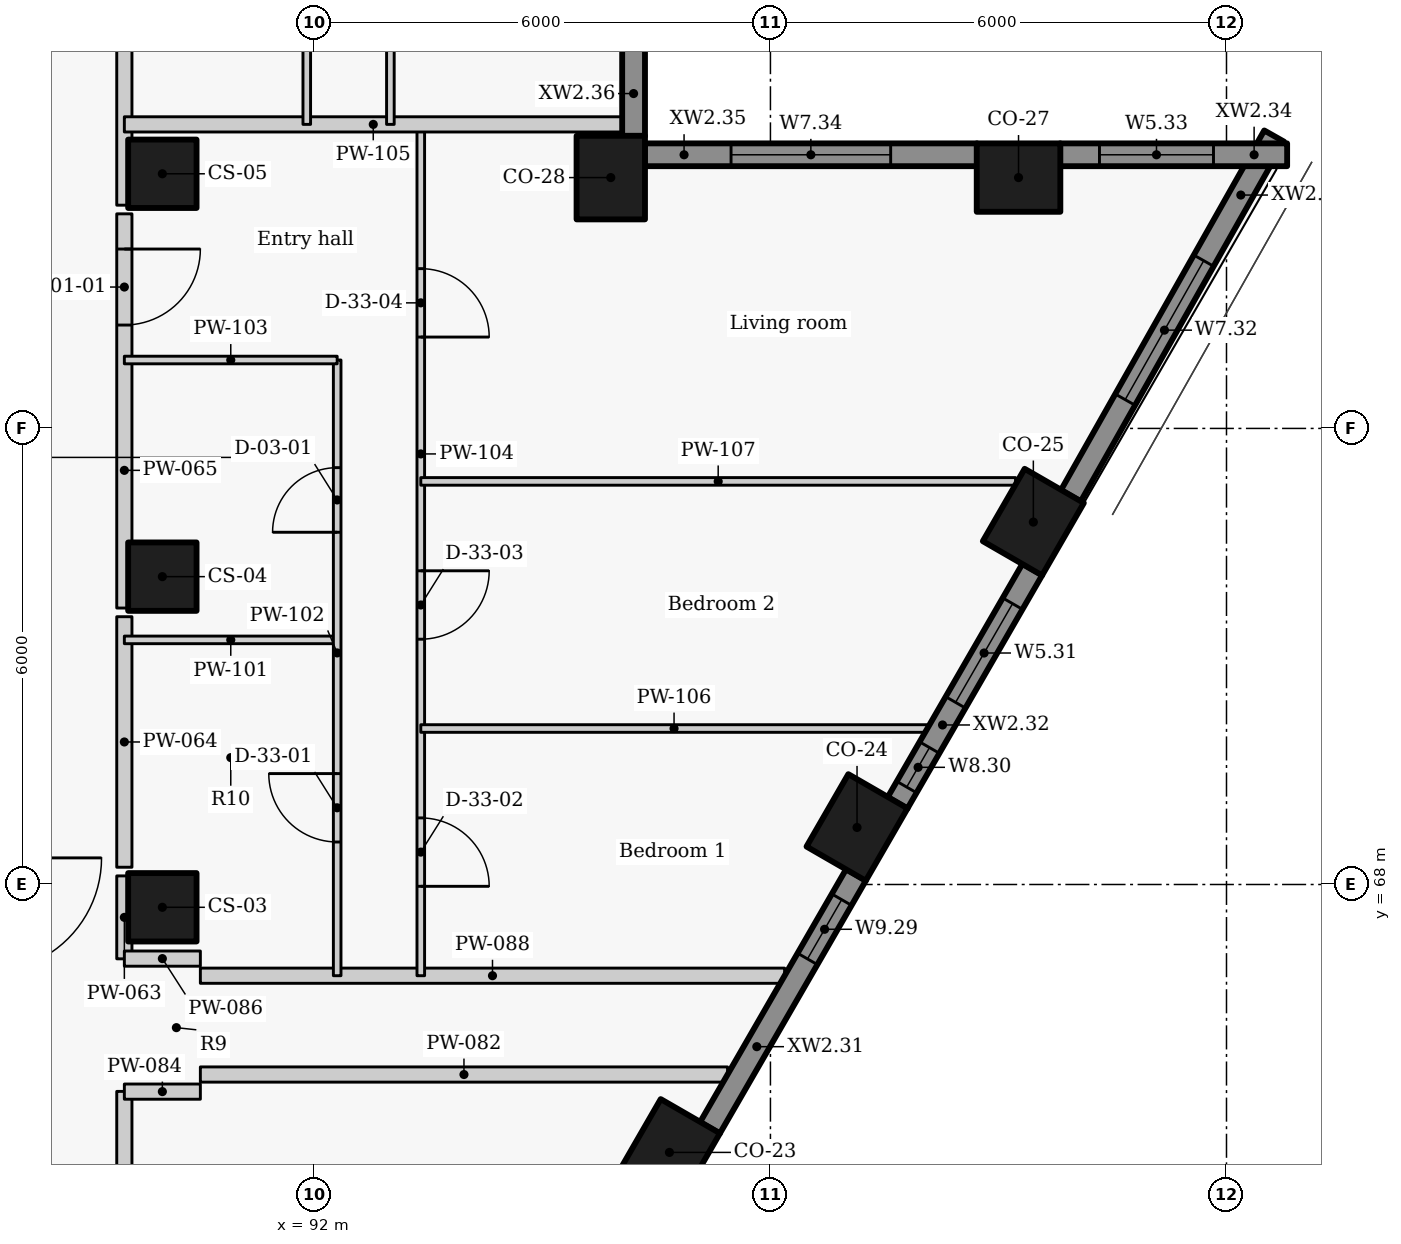
"""IFC4 building model, lengths in metres.
Left out: names, types, materials, properties, quantities, classifications, styles, units other than length and angle.
Written with IfcOpenShell. Run it as: python <this file> out.ifc"""

import sys

from ifc_helpers import new_model, si_unit, direction, frame, frame_2d, origin, origin_2d, place, context, subcontext, project, spatial, rectangle, extrude, element, fill, save


model = new_model("IFC4")
c1 = context("Model", 3, precision=1e-05, world=origin(), true_north=direction((0.0, 1.0)))
c2 = subcontext(c1, "Body", "Model", "MODEL_VIEW")
j1 = project(units=[si_unit("LENGTHUNIT", "METRE"), si_unit("PLANEANGLEUNIT", "RADIAN")], contexts=[c1])
p1 = place(None, origin())
s1 = spatial("IfcSite", under=j1, at=p1, CompositionType="ELEMENT")
p2 = place(p1, origin())
s2 = spatial("IfcBuilding", under=s1, at=p2, CompositionType="ELEMENT")
p3 = place(p2, frame((0.0, 0.0, 239.4)))
s3 = spatial("IfcBuildingStorey", under=s2, at=p3, CompositionType="ELEMENT", Elevation=239.4)
for number, where, z_axis, x_axis in (
    (1, (96.671, 64.475, 0.0), (0.0, 0.0, 1.0), (0.5, 0.866, 0.0)),
    (2, (99.139, 68.75, 0.0), (0.0, 0.0, 1.0), (0.5, 0.866, 0.0)),
    (3, (101.459, 72.768, 0.0), (0.0, 0.0, 1.0), (0.5, 0.866, 0.0)),
    (4, (101.264, 77.3, 0.0), (0.0, 0.0, 1.0), (-1.0, 0.0, 0.0)),
    (5, (95.899, 77.3, 0.0), (0.0, 0.0, 1.0), (0.0, 1.0, 0.0)),
):
    element("IfcColumn", number, at=place(p3, frame(where, z_axis=z_axis, x_axis=x_axis)), inside=s3, PredefinedType="COLUMN", context=c2, shape_type="SweptSolid", body=[
        extrude(rectangle(XDim=1.1, YDim=0.9, at=origin_2d()), origin(), (0.0, 0.0, 1.0), 3.3),
    ])
for number, where, z_axis, x_axis in (
    (6, (90.0, 67.7, 0.0), (0.0, 0.0, 1.0), (0.0, 1.0, 0.0)),
    (7, (90.0, 72.05, 0.0), (0.0, 0.0, 1.0), (0.0, 1.0, 0.0)),
    (8, (90.0, 77.35, 0.0), (0.0, 0.0, 1.0), (0.0, 1.0, 0.0)),
):
    element("IfcColumn", number, at=place(p3, frame(where, z_axis=z_axis, x_axis=x_axis)), inside=s3, PredefinedType="COLUMN", context=c2, shape_type="SweptSolid", body=[
        extrude(rectangle(XDim=0.9, YDim=0.9, at=origin_2d()), origin(), (0.0, 0.0, 1.0), 3.3),
    ])
p4 = place(p3, frame((97.204, 64.798, 0.0), z_axis=(0.0, 0.0, 1.0), x_axis=(0.499984490703, 0.866034357896, 0.0)))
e9 = element("IfcWall", 9, at=p4, inside=s3, PredefinedType="SOLIDWALL", context=c2, shape_type="SweptSolid", body=[
    extrude(rectangle(XDim=3.844, YDim=0.3, at=frame_2d((1.922, 0.0))), origin(), (0.0, 0.0, 1.0), 2.425),
])
p5 = place(p4, frame((2.567, 0.0, 0.9)))
e10 = element("IfcOpeningElement", 10, at=p5, cuts=e9, PredefinedType="OPENING", context=c2, shape_type="SweptSolid", body=[
    extrude(rectangle(XDim=0.9, YDim=1.1, at=frame_2d((0.45, 0.55))), frame((0.0, 0.16, 0.0), z_axis=(0.0, -1.0, 0.0), x_axis=(1.0, 0.0, 0.0)), (0.0, 0.0, 1.0), 0.32),
])
p6 = place(p3, frame((99.672, 69.073, 0.0), z_axis=(0.0, 0.0, 1.0), x_axis=(0.500010404316, 0.866019396766, 0.0)))
e11 = element("IfcWall", 11, at=p6, inside=s3, PredefinedType="SOLIDWALL", context=c2, shape_type="SweptSolid", body=[
    extrude(rectangle(XDim=3.547, YDim=0.3, at=frame_2d((1.774, 0.0))), origin(), (0.0, 0.0, 1.0), 2.425),
])
p7 = place(p6, frame((0.241, 0.0, 0.9)))
e12 = element("IfcOpeningElement", 12, at=p7, cuts=e11, PredefinedType="OPENING", context=c2, shape_type="SweptSolid", body=[
    extrude(rectangle(XDim=0.6, YDim=1.1, at=frame_2d((0.3, 0.55))), frame((0.0, 0.16, 0.0), z_axis=(0.0, -1.0, 0.0), x_axis=(1.0, 0.0, 0.0)), (0.0, 0.0, 1.0), 0.32),
])
p8 = place(p6, frame((1.527, 0.0, 0.9)))
e13 = element("IfcOpeningElement", 13, at=p8, cuts=e11, PredefinedType="OPENING", context=c2, shape_type="SweptSolid", body=[
    extrude(rectangle(XDim=1.5, YDim=1.1, at=frame_2d((0.75, 0.55))), frame((0.0, 0.16, 0.0), z_axis=(0.0, -1.0, 0.0), x_axis=(1.0, 0.0, 0.0)), (0.0, 0.0, 1.0), 0.32),
])
p9 = place(p3, frame((101.952, 73.114, 0.0), z_axis=(0.0, 0.0, 1.0), x_axis=(0.492080931903, 0.870549456641, 0.0)))
e14 = element("IfcWall", 14, at=p9, inside=s3, PredefinedType="SOLIDWALL", context=c2, shape_type="SweptSolid", body=[
    extrude(rectangle(XDim=5.437, YDim=0.3, at=frame_2d((2.718, 0.0))), origin(), (0.0, 0.0, 1.0), 2.425),
])
p10 = place(p9, frame((1.453, 0.0, 0.9)))
e15 = element("IfcOpeningElement", 15, at=p10, cuts=e14, PredefinedType="OPENING", context=c2, shape_type="SweptSolid", body=[
    extrude(rectangle(XDim=2.1, YDim=1.1, at=frame_2d((1.05, 0.55))), frame((0.0, 0.16, 0.0), z_axis=(0.0, -1.0, 0.0), x_axis=(1.0, 0.0, 0.0)), (0.0, 0.0, 1.0), 0.32),
])
p11 = place(p3, frame((104.798, 77.6, 0.0), z_axis=(0.0, 0.0, 1.0), x_axis=(-1.0, 0.0, 0.0)))
e16 = element("IfcWall", 16, at=p11, inside=s3, PredefinedType="SOLIDWALL", context=c2, shape_type="SweptSolid", body=[
    extrude(rectangle(XDim=2.988, YDim=0.3, at=frame_2d((1.494, 0.0))), origin(), (0.0, 0.0, 1.0), 2.425),
])
p12 = place(p11, frame((0.969, 0.0, 0.9)))
e17 = element("IfcOpeningElement", 17, at=p12, cuts=e16, PredefinedType="OPENING", context=c2, shape_type="SweptSolid", body=[
    extrude(rectangle(XDim=1.5, YDim=1.1, at=frame_2d((0.75, 0.55))), frame((0.0, 0.16, 0.0), z_axis=(0.0, -1.0, 0.0), x_axis=(1.0, 0.0, 0.0)), (0.0, 0.0, 1.0), 0.32),
])
p13 = place(p3, frame((100.718, 77.6, 0.0), z_axis=(0.0, 0.0, 1.0), x_axis=(-1.0, 0.0, 0.0)))
e18 = element("IfcWall", 18, at=p13, inside=s3, PredefinedType="SOLIDWALL", context=c2, shape_type="SweptSolid", body=[
    extrude(rectangle(XDim=4.373, YDim=0.3, at=frame_2d((2.186, 0.0))), origin(), (0.0, 0.0, 1.0), 2.425),
])
p14 = place(p13, frame((1.136, 0.0, 0.9)))
e19 = element("IfcOpeningElement", 19, at=p14, cuts=e18, PredefinedType="OPENING", context=c2, shape_type="SweptSolid", body=[
    extrude(rectangle(XDim=2.1, YDim=1.1, at=frame_2d((1.05, 0.55))), frame((0.0, 0.16, 0.0), z_axis=(0.0, -1.0, 0.0), x_axis=(1.0, 0.0, 0.0)), (0.0, 0.0, 1.0), 0.32),
])
p15 = place(p3, frame((96.199, 77.846, 0.0), z_axis=(0.0, 0.0, 1.0), x_axis=(0.0, 1.0, 0.0)))
e20 = element("IfcWall", 20, at=p15, inside=s3, PredefinedType="SOLIDWALL", context=c2, shape_type="SweptSolid", body=[
    extrude(rectangle(XDim=4.408, YDim=0.3, at=frame_2d((2.204, 0.0))), origin(), (0.0, 0.0, 1.0), 2.425),
])
p16 = place(p15, frame((1.219, 0.0, 0.9)))
e21 = element("IfcOpeningElement", 21, at=p16, cuts=e20, PredefinedType="OPENING", context=c2, shape_type="SweptSolid", body=[
    extrude(rectangle(XDim=2.1, YDim=1.1, at=frame_2d((1.05, 0.55))), frame((0.0, 0.16, 0.0), z_axis=(0.0, -1.0, 0.0), x_axis=(1.0, 0.0, 0.0)), (0.0, 0.0, 1.0), 0.32),
])
p17 = place(p3, frame((89.5, 62.937, 0.0), z_axis=(0.0, 0.0, 1.0), x_axis=(0.0, 1.0, 0.0)))
e22 = element("IfcWall", 22, at=p17, inside=s3, PredefinedType="PARTITIONING", context=c2, shape_type="SweptSolid", body=[
    extrude(rectangle(XDim=2.341, YDim=0.2, at=frame_2d((1.17, 0.0))), origin(), (0.0, 0.0, 1.0), 3.025),
])
p18 = place(p3, frame((89.5, 67.022, 0.0), z_axis=(0.0, 0.0, 1.0), x_axis=(0.0, 1.0, 0.0)))
e23 = element("IfcWall", 23, at=p18, inside=s3, PredefinedType="PARTITIONING", context=c2, shape_type="SweptSolid", body=[
    extrude(rectangle(XDim=1.091, YDim=0.2, at=frame_2d((0.545, 0.0))), origin(), (0.0, 0.0, 1.0), 3.025),
])
p19 = place(p3, frame((89.5, 68.227, 0.0), z_axis=(0.0, 0.0, 1.0), x_axis=(0.0, 1.0, 0.0)))
e24 = element("IfcWall", 24, at=p19, inside=s3, PredefinedType="PARTITIONING", context=c2, shape_type="SweptSolid", body=[
    extrude(rectangle(XDim=3.296, YDim=0.2, at=frame_2d((1.648, 0.0))), origin(), (0.0, 0.0, 1.0), 3.025),
])
p20 = place(p3, frame((89.5, 76.823, 0.0), z_axis=(0.0, 0.0, 1.0), x_axis=(0.0, -1.0, 0.0)))
e25 = element("IfcWall", 25, at=p20, inside=s3, PredefinedType="PARTITIONING", context=c2, shape_type="SweptSolid", body=[
    extrude(rectangle(XDim=5.186, YDim=0.2, at=frame_2d((2.593, 0.0))), origin(), (0.0, 0.0, 1.0), 3.025),
])
p21 = place(p20, frame((0.463, 0.0, 0.0)))
e26 = element("IfcOpeningElement", 26, at=p21, cuts=e25, PredefinedType="OPENING", context=c2, shape_type="SweptSolid", body=[
    extrude(rectangle(XDim=1.0, YDim=2.1, at=frame_2d((0.5, 1.05))), frame((0.0, 0.11, 0.0), z_axis=(0.0, -1.0, 0.0), x_axis=(1.0, 0.0, 0.0)), (0.0, 0.0, 1.0), 0.22),
])
p22 = place(p3, frame((89.5, 76.937, 0.0), z_axis=(0.0, 0.0, 1.0), x_axis=(0.0, 1.0, 0.0)))
e27 = element("IfcWall", 27, at=p22, inside=s3, PredefinedType="PARTITIONING", context=c2, shape_type="SweptSolid", body=[
    extrude(rectangle(XDim=5.102, YDim=0.2, at=frame_2d((2.551, 0.0))), origin(), (0.0, 0.0, 1.0), 3.025),
])
p23 = place(p3, frame((90.5, 65.5, 0.0), z_axis=(0.0, 0.0, 1.0), x_axis=(1.0, 0.0, 0.0)))
e28 = element("IfcWall", 28, at=p23, inside=s3, PredefinedType="PARTITIONING", context=c2, shape_type="SweptSolid", body=[
    extrude(rectangle(XDim=6.936, YDim=0.2, at=frame_2d((3.468, 0.0))), origin(), (0.0, 0.0, 1.0), 2.405),
])
for number, where, z_axis, x_axis in (
    (29, (89.5, 65.275, 0.0), (0.0, 0.0, 1.0), (1.0, 0.0, 0.0)),
    (30, (89.5, 67.025, 0.0), (0.0, 0.0, 1.0), (1.0, 0.0, 0.0)),
):
    element("IfcWall", number, at=place(p3, frame(where, z_axis=z_axis, x_axis=x_axis)), inside=s3, PredefinedType="PARTITIONING", context=c2, shape_type="SweptSolid", body=[
        extrude(rectangle(XDim=1.0, YDim=0.2, at=frame_2d((0.5, 0.0))), origin(), (0.0, 0.0, 1.0), 2.505),
    ])
p24 = place(p3, frame((90.5, 66.8, 0.0), z_axis=(0.0, 0.0, 1.0), x_axis=(1.0, 0.0, 0.0)))
e31 = element("IfcWall", 31, at=p24, inside=s3, PredefinedType="PARTITIONING", context=c2, shape_type="SweptSolid", body=[
    extrude(rectangle(XDim=7.687, YDim=0.2, at=frame_2d((3.843, 0.0))), origin(), (0.0, 0.0, 1.0), 2.405),
])
p25 = place(p3, frame((89.5, 71.218, 0.0), z_axis=(0.0, 0.0, 1.0), x_axis=(1.0, 0.0, 0.0)))
e32 = element("IfcWall", 32, at=p25, inside=s3, PredefinedType="PARTITIONING", context=c2, shape_type="SweptSolid", body=[
    extrude(rectangle(XDim=2.8, YDim=0.1, at=frame_2d((1.4, 0.0))), origin(), (0.0, 0.0, 1.0), 2.505),
])
p26 = place(p3, frame((92.3, 66.8, 0.0), z_axis=(0.0, 0.0, 1.0), x_axis=(0.0, 1.0, 0.0)))
e33 = element("IfcWall", 33, at=p26, inside=s3, PredefinedType="PARTITIONING", context=c2, shape_type="SweptSolid", body=[
    extrude(rectangle(XDim=8.1, YDim=0.1, at=frame_2d((4.05, 0.0))), origin(), (0.0, 0.0, 1.0), 3.025),
])
p27 = place(p26, frame((1.759, 0.0, 0.0)))
e34 = element("IfcOpeningElement", 34, at=p27, cuts=e33, PredefinedType="OPENING", context=c2, shape_type="SweptSolid", body=[
    extrude(rectangle(XDim=0.9, YDim=2.1, at=frame_2d((0.45, 1.05))), frame((0.0, 0.06, 0.0), z_axis=(0.0, -1.0, 0.0), x_axis=(1.0, 0.0, 0.0)), (0.0, 0.0, 1.0), 0.12),
])
p28 = place(p26, frame((5.834, 0.0, 0.0)))
e35 = element("IfcOpeningElement", 35, at=p28, cuts=e33, PredefinedType="OPENING", context=c2, shape_type="SweptSolid", body=[
    extrude(rectangle(XDim=0.85, YDim=2.1, at=frame_2d((0.425, 1.05))), frame((0.0, 0.06, 0.0), z_axis=(0.0, -1.0, 0.0), x_axis=(1.0, 0.0, 0.0)), (0.0, 0.0, 1.0), 0.12),
])
p29 = place(p3, frame((89.5, 74.9, 0.0), z_axis=(0.0, 0.0, 1.0), x_axis=(1.0, 0.0, 0.0)))
e36 = element("IfcWall", 36, at=p29, inside=s3, PredefinedType="PARTITIONING", context=c2, shape_type="SweptSolid", body=[
    extrude(rectangle(XDim=2.8, YDim=0.1, at=frame_2d((1.4, 0.0))), origin(), (0.0, 0.0, 1.0), 2.505),
])
p30 = place(p3, frame((93.4, 78.0, 0.0), z_axis=(0.0, 0.0, 1.0), x_axis=(0.0, -1.0, 0.0)))
e37 = element("IfcWall", 37, at=p30, inside=s3, PredefinedType="PARTITIONING", context=c2, shape_type="SweptSolid", body=[
    extrude(rectangle(XDim=11.2, YDim=0.1, at=frame_2d((5.6, 0.0))), origin(), (0.0, 0.0, 1.0), 3.025),
])
p31 = place(p30, frame((9.124, 0.0, 0.0)))
e38 = element("IfcOpeningElement", 38, at=p31, cuts=e37, PredefinedType="OPENING", context=c2, shape_type="SweptSolid", body=[
    extrude(rectangle(XDim=0.9, YDim=2.1, at=frame_2d((0.45, 1.05))), frame((0.0, 0.06, 0.0), z_axis=(0.0, -1.0, 0.0), x_axis=(1.0, 0.0, 0.0)), (0.0, 0.0, 1.0), 0.12),
])
p32 = place(p30, frame((5.873, 0.0, 0.0)))
e39 = element("IfcOpeningElement", 39, at=p32, cuts=e37, PredefinedType="OPENING", context=c2, shape_type="SweptSolid", body=[
    extrude(rectangle(XDim=0.9, YDim=2.1, at=frame_2d((0.45, 1.05))), frame((0.0, 0.06, 0.0), z_axis=(0.0, -1.0, 0.0), x_axis=(1.0, 0.0, 0.0)), (0.0, 0.0, 1.0), 0.12),
])
p33 = place(p30, frame((1.898, 0.0, 0.0)))
e40 = element("IfcOpeningElement", 40, at=p33, cuts=e37, PredefinedType="OPENING", context=c2, shape_type="SweptSolid", body=[
    extrude(rectangle(XDim=0.9, YDim=2.1, at=frame_2d((0.45, 1.05))), frame((0.0, 0.06, 0.0), z_axis=(0.0, -1.0, 0.0), x_axis=(1.0, 0.0, 0.0)), (0.0, 0.0, 1.0), 0.12),
])
p34 = place(p3, frame((89.5, 78.0, 0.0), z_axis=(0.0, 0.0, 1.0), x_axis=(1.0, 0.0, 0.0)))
e41 = element("IfcWall", 41, at=p34, inside=s3, PredefinedType="PARTITIONING", context=c2, shape_type="SweptSolid", body=[
    extrude(rectangle(XDim=6.55, YDim=0.2, at=frame_2d((3.275, 0.0))), origin(), (0.0, 0.0, 1.0), 2.405),
])
p35 = place(p3, frame((93.4, 70.052, 0.0), z_axis=(0.0, 0.0, 1.0), x_axis=(1.0, 0.0, 0.0)))
e42 = element("IfcWall", 42, at=p35, inside=s3, PredefinedType="PARTITIONING", context=c2, shape_type="SweptSolid", body=[
    extrude(rectangle(XDim=6.664, YDim=0.1, at=frame_2d((3.332, 0.0))), origin(), (0.0, 0.0, 1.0), 2.405),
])
p36 = place(p3, frame((93.4, 73.303, 0.0), z_axis=(0.0, 0.0, 1.0), x_axis=(1.0, 0.0, 0.0)))
e43 = element("IfcWall", 43, at=p36, inside=s3, PredefinedType="PARTITIONING", context=c2, shape_type="SweptSolid", body=[
    extrude(rectangle(XDim=7.825, YDim=0.1, at=frame_2d((3.913, 0.0))), origin(), (0.0, 0.0, 1.0), 3.025),
])
p37 = place(p3, frame((91.9, 78.0, 0.0), z_axis=(0.0, 0.0, 1.0), x_axis=(0.0, 1.0, 0.0)))
e44 = element("IfcWall", 44, at=p37, inside=s3, PredefinedType="PARTITIONING", context=c2, shape_type="SweptSolid", body=[
    extrude(rectangle(XDim=7.4, YDim=0.1, at=frame_2d((3.7, 0.0))), origin(), (0.0, 0.0, 1.0), 3.025),
])
p38 = place(p37, frame((1.568, 0.0, 0.0)))
e45 = element("IfcOpeningElement", 45, at=p38, cuts=e44, PredefinedType="OPENING", context=c2, shape_type="SweptSolid", body=[
    extrude(rectangle(XDim=0.9, YDim=2.1, at=frame_2d((0.45, 1.05))), frame((0.0, 0.06, 0.0), z_axis=(0.0, -1.0, 0.0), x_axis=(1.0, 0.0, 0.0)), (0.0, 0.0, 1.0), 0.12),
])
p39 = place(p37, frame((5.293, 0.0, 0.0)))
e46 = element("IfcOpeningElement", 46, at=p39, cuts=e44, PredefinedType="OPENING", context=c2, shape_type="SweptSolid", body=[
    extrude(rectangle(XDim=0.85, YDim=2.1, at=frame_2d((0.425, 1.05))), frame((0.0, 0.06, 0.0), z_axis=(0.0, -1.0, 0.0), x_axis=(1.0, 0.0, 0.0)), (0.0, 0.0, 1.0), 0.12),
])
p40 = place(p3, frame((93.0, 87.0, 0.0), z_axis=(0.0, 0.0, 1.0), x_axis=(0.0, -1.0, 0.0)))
e47 = element("IfcWall", 47, at=p40, inside=s3, PredefinedType="PARTITIONING", context=c2, shape_type="SweptSolid", body=[
    extrude(rectangle(XDim=9.0, YDim=0.1, at=frame_2d((4.5, 0.0))), origin(), (0.0, 0.0, 1.0), 3.025),
])
p41 = place(p40, frame((4.05, 0.0, 0.0)))
e48 = element("IfcOpeningElement", 48, at=p41, cuts=e47, PredefinedType="OPENING", context=c2, shape_type="SweptSolid", body=[
    extrude(rectangle(XDim=0.9, YDim=2.1, at=frame_2d((0.45, 1.05))), frame((0.0, 0.06, 0.0), z_axis=(0.0, -1.0, 0.0), x_axis=(1.0, 0.0, 0.0)), (0.0, 0.0, 1.0), 0.12),
])
p42 = place(p5, origin())
e49 = element("IfcWindow", 49, at=p42, inside=s3, PartitioningType="SINGLE_PANEL", PredefinedType="WINDOW", context=c2, shape_type="SweptSolid", body=[
    extrude(rectangle(XDim=0.9, YDim=1.1, at=frame_2d((0.45, 0.55))), frame((0.0, 0.03, 0.0), z_axis=(0.0, -1.0, 0.0), x_axis=(1.0, 0.0, 0.0)), (0.0, 0.0, 1.0), 0.06),
])
fill(e10, e49)
p43 = place(p7, origin())
e50 = element("IfcWindow", 50, at=p43, inside=s3, PartitioningType="SINGLE_PANEL", PredefinedType="WINDOW", context=c2, shape_type="SweptSolid", body=[
    extrude(rectangle(XDim=0.6, YDim=1.1, at=frame_2d((0.3, 0.55))), frame((0.0, 0.03, 0.0), z_axis=(0.0, -1.0, 0.0), x_axis=(1.0, 0.0, 0.0)), (0.0, 0.0, 1.0), 0.06),
])
fill(e12, e50)
p44 = place(p8, origin())
e51 = element("IfcWindow", 51, at=p44, inside=s3, PartitioningType="SINGLE_PANEL", PredefinedType="WINDOW", context=c2, shape_type="SweptSolid", body=[
    extrude(rectangle(XDim=1.5, YDim=1.1, at=frame_2d((0.75, 0.55))), frame((0.0, 0.03, 0.0), z_axis=(0.0, -1.0, 0.0), x_axis=(1.0, 0.0, 0.0)), (0.0, 0.0, 1.0), 0.06),
])
fill(e13, e51)
p45 = place(p10, origin())
e52 = element("IfcWindow", 52, at=p45, inside=s3, PartitioningType="SINGLE_PANEL", PredefinedType="WINDOW", context=c2, shape_type="SweptSolid", body=[
    extrude(rectangle(XDim=2.1, YDim=1.1, at=frame_2d((1.05, 0.55))), frame((0.0, 0.03, 0.0), z_axis=(0.0, -1.0, 0.0), x_axis=(1.0, 0.0, 0.0)), (0.0, 0.0, 1.0), 0.06),
])
fill(e15, e52)
p46 = place(p12, origin())
e53 = element("IfcWindow", 53, at=p46, inside=s3, PartitioningType="SINGLE_PANEL", PredefinedType="WINDOW", context=c2, shape_type="SweptSolid", body=[
    extrude(rectangle(XDim=1.5, YDim=1.1, at=frame_2d((0.75, 0.55))), frame((0.0, 0.03, 0.0), z_axis=(0.0, -1.0, 0.0), x_axis=(1.0, 0.0, 0.0)), (0.0, 0.0, 1.0), 0.06),
])
fill(e17, e53)
p47 = place(p14, origin())
e54 = element("IfcWindow", 54, at=p47, inside=s3, PartitioningType="SINGLE_PANEL", PredefinedType="WINDOW", context=c2, shape_type="SweptSolid", body=[
    extrude(rectangle(XDim=2.1, YDim=1.1, at=frame_2d((1.05, 0.55))), frame((0.0, 0.03, 0.0), z_axis=(0.0, -1.0, 0.0), x_axis=(1.0, 0.0, 0.0)), (0.0, 0.0, 1.0), 0.06),
])
fill(e19, e54)
p48 = place(p21, origin())
e55 = element("IfcDoor", 55, at=p48, inside=s3, OperationType="SINGLE_SWING_LEFT", PredefinedType="DOOR", context=c2, shape_type="SweptSolid", body=[
    extrude(rectangle(XDim=1.0, YDim=2.1, at=frame_2d((0.5, 1.05))), frame((0.0, 0.025, 0.0), z_axis=(0.0, -1.0, 0.0), x_axis=(1.0, 0.0, 0.0)), (0.0, 0.0, 1.0), 0.05),
])
fill(e26, e55)
p49 = place(p27, origin())
e56 = element("IfcDoor", 56, at=p49, inside=s3, OperationType="SINGLE_SWING_RIGHT", PredefinedType="DOOR", context=c2, shape_type="SweptSolid", body=[
    extrude(rectangle(XDim=0.9, YDim=2.1, at=frame_2d((0.45, 1.05))), frame((0.0, 0.025, 0.0), z_axis=(0.0, -1.0, 0.0), x_axis=(1.0, 0.0, 0.0)), (0.0, 0.0, 1.0), 0.05),
])
fill(e34, e56)
p50 = place(p28, origin())
e57 = element("IfcDoor", 57, at=p50, inside=s3, OperationType="SINGLE_SWING_LEFT", PredefinedType="DOOR", context=c2, shape_type="SweptSolid", body=[
    extrude(rectangle(XDim=0.85, YDim=2.1, at=frame_2d((0.425, 1.05))), frame((0.0, 0.025, 0.0), z_axis=(0.0, -1.0, 0.0), x_axis=(1.0, 0.0, 0.0)), (0.0, 0.0, 1.0), 0.05),
])
fill(e35, e57)
p51 = place(p31, origin())
e58 = element("IfcDoor", 58, at=p51, inside=s3, OperationType="SINGLE_SWING_RIGHT", PredefinedType="DOOR", context=c2, shape_type="SweptSolid", body=[
    extrude(rectangle(XDim=0.9, YDim=2.1, at=frame_2d((0.45, 1.05))), frame((0.0, 0.025, 0.0), z_axis=(0.0, -1.0, 0.0), x_axis=(1.0, 0.0, 0.0)), (0.0, 0.0, 1.0), 0.05),
])
fill(e38, e58)
p52 = place(p32, origin())
e59 = element("IfcDoor", 59, at=p52, inside=s3, OperationType="SINGLE_SWING_LEFT", PredefinedType="DOOR", context=c2, shape_type="SweptSolid", body=[
    extrude(rectangle(XDim=0.9, YDim=2.1, at=frame_2d((0.45, 1.05))), frame((0.0, 0.025, 0.0), z_axis=(0.0, -1.0, 0.0), x_axis=(1.0, 0.0, 0.0)), (0.0, 0.0, 1.0), 0.05),
])
fill(e39, e59)
p53 = place(p33, origin())
e60 = element("IfcDoor", 60, at=p53, inside=s3, OperationType="SINGLE_SWING_RIGHT", PredefinedType="DOOR", context=c2, shape_type="SweptSolid", body=[
    extrude(rectangle(XDim=0.9, YDim=2.1, at=frame_2d((0.45, 1.05))), frame((0.0, 0.025, 0.0), z_axis=(0.0, -1.0, 0.0), x_axis=(1.0, 0.0, 0.0)), (0.0, 0.0, 1.0), 0.05),
])
fill(e40, e60)
save(model, sys.argv[1])
